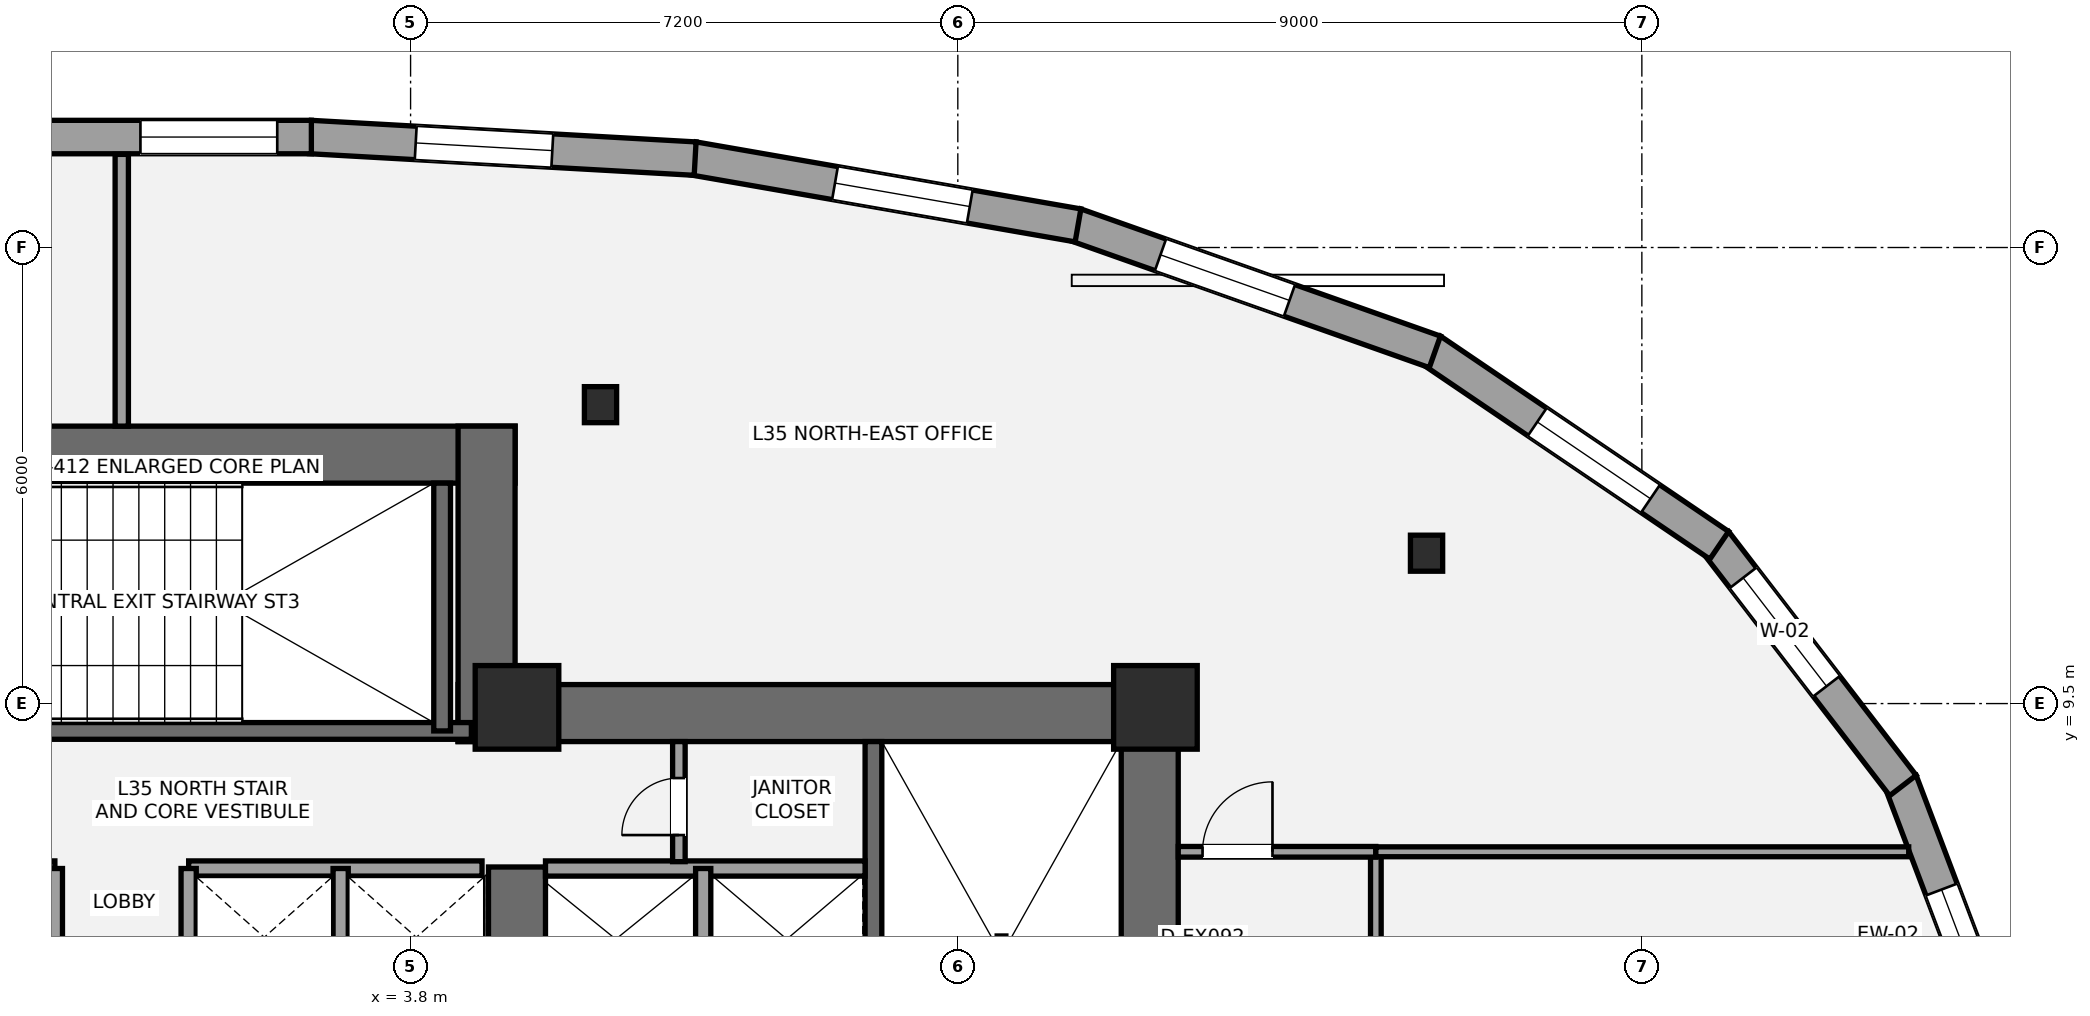
"""IFC4 building model, lengths in metres.
Left out: names, types, materials, properties, quantities, classifications, styles, units other than length and angle.
Written with IfcOpenShell. Run it as: python <this file> out.ifc"""

import sys

from ifc_helpers import new_model, si_unit, direction, frame, frame_2d, origin, origin_2d, place, context, subcontext, project, spatial, rectangle, i_section, extrude, element, fill, save


model = new_model("IFC4")
c1 = context("Model", 3, precision=1e-05, world=origin(), true_north=direction((0.0, 1.0)))
c2 = subcontext(c1, "Body", "Model", "MODEL_VIEW")
j1 = project(units=[si_unit("LENGTHUNIT", "METRE"), si_unit("PLANEANGLEUNIT", "RADIAN")], contexts=[c1])
p1 = place(None, origin())
s1 = spatial("IfcSite", under=j1, at=p1, CompositionType="ELEMENT")
p2 = place(p1, origin())
s2 = spatial("IfcBuilding", under=s1, at=p2, CompositionType="ELEMENT")
p3 = place(p2, frame((0.0, 0.0, 131.6)))
s3 = spatial("IfcBuildingStorey", under=s2, at=p3, CompositionType="ELEMENT", Elevation=131.6)
p4 = place(p3, frame((13.525, 1.1, 0.0), z_axis=(0.0, 0.0, 1.0), x_axis=(0.0, 1.0, 0.0)))
e1 = element("IfcWall", 1, at=p4, inside=s3, PredefinedType="SHEAR", context=c2, shape_type="SweptSolid", body=[
    extrude(rectangle(XDim=8.65, YDim=0.75, at=frame_2d((4.325, 0.0))), origin(), (0.0, 0.0, 1.0), 3.5),
])
p5 = place(p3, frame((4.425, 9.375, 0.0), z_axis=(0.0, 0.0, 1.0), x_axis=(1.0, 0.0, 0.0)))
e2 = element("IfcWall", 2, at=p5, inside=s3, PredefinedType="SHEAR", context=c2, shape_type="SweptSolid", body=[
    extrude(rectangle(XDim=9.475, YDim=0.75, at=frame_2d((4.737, 0.0))), origin(), (0.0, 0.0, 1.0), 3.5),
])
p6 = place(p3, frame((5.2, 5.35, 0.0), z_axis=(0.0, 0.0, 1.0), x_axis=(0.0, 1.0, 0.0)))
e3 = element("IfcWall", 3, at=p6, inside=s3, PredefinedType="SHEAR", context=c2, shape_type="SweptSolid", body=[
    extrude(rectangle(XDim=2.0, YDim=0.75, at=frame_2d((1.0, 0.0))), origin(), (0.0, 0.0, 1.0), 3.5),
])
p7 = place(p3, frame((9.89, 1.85, 0.0), z_axis=(0.0, 0.0, 1.0), x_axis=(0.0, 1.0, 0.0)))
e4 = element("IfcWall", 4, at=p7, inside=s3, PredefinedType="SHEAR", context=c2, shape_type="SweptSolid", body=[
    extrude(rectangle(XDim=7.15, YDim=0.22, at=frame_2d((3.575, 0.0))), origin(), (0.0, 0.0, 1.0), 3.5),
])
p8 = place(p3, frame((-5.175, 12.775, 0.0), z_axis=(0.0, 0.0, 1.0), x_axis=(1.0, 0.0, 0.0)))
e5 = element("IfcWall", 5, at=p8, inside=s3, PredefinedType="SHEAR", context=c2, shape_type="SweptSolid", body=[
    extrude(rectangle(XDim=10.35, YDim=0.75, at=frame_2d((5.175, 0.0))), origin(), (0.0, 0.0, 1.0), 3.5),
])
p9 = place(p3, frame((4.8, 9.0, 0.0), z_axis=(0.0, 0.0, 1.0), x_axis=(0.0, 1.0, 0.0)))
e6 = element("IfcWall", 6, at=p9, inside=s3, PredefinedType="SHEAR", context=c2, shape_type="SweptSolid", body=[
    extrude(rectangle(XDim=4.15, YDim=0.75, at=frame_2d((2.075, 0.0))), origin(), (0.0, 0.0, 1.0), 3.5),
])
p10 = place(p3, frame((-4.7, 9.14, 0.0), z_axis=(0.0, 0.0, 1.0), x_axis=(1.0, 0.0, 0.0)))
e7 = element("IfcWall", 7, at=p10, inside=s3, PredefinedType="SHEAR", context=c2, shape_type="SweptSolid", body=[
    extrude(rectangle(XDim=9.3, YDim=0.22, at=frame_2d((4.65, 0.0))), origin(), (0.0, 0.0, 1.0), 3.5),
])
p11 = place(p10, frame((1.15, 0.0, 0.0)))
e8 = element("IfcOpeningElement", 8, at=p11, cuts=e7, PredefinedType="OPENING", context=c2, shape_type="SweptSolid", body=[
    extrude(rectangle(XDim=1.05, YDim=2.15, at=frame_2d((0.525, 1.075))), frame((0.0, 0.12, 0.0), z_axis=(0.0, -1.0, 0.0), x_axis=(1.0, 0.0, 0.0)), (0.0, 0.0, 1.0), 0.24),
])
p12 = place(p3, frame((4.215, 9.14, 0.0), z_axis=(0.0, 0.0, 1.0), x_axis=(0.0, 1.0, 0.0)))
e9 = element("IfcWall", 9, at=p12, inside=s3, PredefinedType="SHEAR", context=c2, shape_type="SweptSolid", body=[
    extrude(rectangle(XDim=3.26, YDim=0.22, at=frame_2d((1.63, 0.0))), origin(), (0.0, 0.0, 1.0), 3.5),
])
for number, where, z_axis, x_axis in (
    (10, (5.2, 9.45, 0.0), (0.0, 0.0, 1.0), (1.0, 0.0, 0.0)),
    (11, (13.6, 9.45, 0.0), (0.0, 0.0, 1.0), (1.0, 0.0, 0.0)),
):
    element("IfcColumn", number, at=place(p3, frame(where, z_axis=z_axis, x_axis=x_axis)), inside=s3, PredefinedType="COLUMN", context=c2, shape_type="SweptSolid", body=[
        extrude(rectangle(XDim=1.1, YDim=1.1, at=origin_2d()), origin(), (0.0, 0.0, 1.0), 3.5),
    ])
for number, where, z_axis, x_axis in (
    (12, (17.167, 11.478, 0.0), (0.0, 0.0, 1.0), (1.0, 0.0, 0.0)),
    (13, (6.299, 13.433, 0.0), (0.0, 0.0, 1.0), (1.0, 0.0, 0.0)),
):
    element("IfcColumn", number, at=place(p3, frame(where, z_axis=z_axis, x_axis=x_axis)), inside=s3, PredefinedType="COLUMN", context=c2, shape_type="SweptSolid", body=[
        extrude(i_section(OverallWidth=0.424, OverallDepth=0.474, WebThickness=0.048, FlangeThickness=0.077, at=origin_2d()), origin(), (0.0, 0.0, 1.0), 3.5),
    ])
p13 = place(p3, frame((23.403, 8.478, 0.0), z_axis=(0.0, 0.0, 1.0), x_axis=(0.354219131363, -0.935162449511, 0.0)))
e14 = element("IfcWall", 14, at=p13, inside=s3, PredefinedType="STANDARD", context=c2, shape_type="SweptSolid", body=[
    extrude(rectangle(XDim=3.671, YDim=0.44, at=frame_2d((1.835, 0.0))), origin(), (0.0, 0.0, 1.0), 2.478),
])
p14 = place(p13, frame((1.524, 0.0, 0.65)))
e15 = element("IfcOpeningElement", 15, at=p14, cuts=e14, PredefinedType="OPENING", context=c2, shape_type="SweptSolid", body=[
    extrude(rectangle(XDim=1.8, YDim=1.7, at=frame_2d((0.9, 0.85))), frame((0.0, 0.23, 0.0), z_axis=(0.0, -1.0, 0.0), x_axis=(1.0, 0.0, 0.0)), (0.0, 0.0, 1.0), 0.46),
])
p15 = place(p3, frame((20.967, 11.63, 0.0), z_axis=(0.0, 0.0, 1.0), x_axis=(0.60975157382, -0.792592592839, 0.0)))
e16 = element("IfcWall", 16, at=p15, inside=s3, PredefinedType="STANDARD", context=c2, shape_type="SweptSolid", body=[
    extrude(rectangle(XDim=4.047, YDim=0.44, at=frame_2d((2.023, 0.0))), origin(), (0.0, 0.0, 1.0), 2.482),
])
p16 = place(p15, frame((0.599, 0.0, 0.65)))
e17 = element("IfcOpeningElement", 17, at=p16, cuts=e16, PredefinedType="OPENING", context=c2, shape_type="SweptSolid", body=[
    extrude(rectangle(XDim=1.8, YDim=1.7, at=frame_2d((0.9, 0.85))), frame((0.0, 0.23, 0.0), z_axis=(0.0, -1.0, 0.0), x_axis=(1.0, 0.0, 0.0)), (0.0, 0.0, 1.0), 0.46),
])
p17 = place(p3, frame((17.227, 14.152, 0.0), z_axis=(0.0, 0.0, 1.0), x_axis=(0.827670311179, -0.561214625605, 0.0)))
e18 = element("IfcWall", 18, at=p17, inside=s3, PredefinedType="STANDARD", context=c2, shape_type="SweptSolid", body=[
    extrude(rectangle(XDim=4.58, YDim=0.44, at=frame_2d((2.29, 0.0))), origin(), (0.0, 0.0, 1.0), 2.482),
])
p18 = place(p17, frame((1.688, 0.0, 0.65)))
e19 = element("IfcOpeningElement", 19, at=p18, cuts=e18, PredefinedType="OPENING", context=c2, shape_type="SweptSolid", body=[
    extrude(rectangle(XDim=1.8, YDim=1.7, at=frame_2d((0.9, 0.85))), frame((0.0, 0.23, 0.0), z_axis=(0.0, -1.0, 0.0), x_axis=(1.0, 0.0, 0.0)), (0.0, 0.0, 1.0), 0.46),
])
p19 = place(p3, frame((12.546, 15.8, 0.0), z_axis=(0.0, 0.0, 1.0), x_axis=(0.942780868171, -0.333413009061, 0.0)))
e20 = element("IfcWall", 20, at=p19, inside=s3, PredefinedType="STANDARD", context=c2, shape_type="SweptSolid", body=[
    extrude(rectangle(XDim=5.018, YDim=0.44, at=frame_2d((2.509, 0.0))), origin(), (0.0, 0.0, 1.0), 2.478),
])
p20 = place(p19, frame((1.189, 0.0, 0.65)))
e21 = element("IfcOpeningElement", 21, at=p20, cuts=e20, PredefinedType="OPENING", context=c2, shape_type="SweptSolid", body=[
    extrude(rectangle(XDim=1.8, YDim=1.7, at=frame_2d((0.9, 0.85))), frame((0.0, 0.23, 0.0), z_axis=(0.0, -1.0, 0.0), x_axis=(1.0, 0.0, 0.0)), (0.0, 0.0, 1.0), 0.46),
])
p21 = place(p3, frame((7.518, 16.673, 0.0), z_axis=(0.0, 0.0, 1.0), x_axis=(0.985177916526, -0.171535631254, 0.0)))
e22 = element("IfcWall", 22, at=p21, inside=s3, PredefinedType="STANDARD", context=c2, shape_type="SweptSolid", body=[
    extrude(rectangle(XDim=5.139, YDim=0.44, at=frame_2d((2.57, 0.0))), origin(), (0.0, 0.0, 1.0), 2.478),
])
p22 = place(p21, frame((1.894, 0.0, 0.65)))
e23 = element("IfcOpeningElement", 23, at=p22, cuts=e22, PredefinedType="OPENING", context=c2, shape_type="SweptSolid", body=[
    extrude(rectangle(XDim=1.8, YDim=1.7, at=frame_2d((0.9, 0.85))), frame((0.0, 0.23, 0.0), z_axis=(0.0, -1.0, 0.0), x_axis=(1.0, 0.0, 0.0)), (0.0, 0.0, 1.0), 0.46),
])
p23 = place(p3, frame((2.482, 16.954, 0.0), z_axis=(0.0, 0.0, 1.0), x_axis=(0.99842742965, -0.056059501621, 0.0)))
e24 = element("IfcWall", 24, at=p23, inside=s3, PredefinedType="STANDARD", context=c2, shape_type="SweptSolid", body=[
    extrude(rectangle(XDim=5.069, YDim=0.44, at=frame_2d((2.535, 0.0))), origin(), (0.0, 0.0, 1.0), 2.478),
])
p24 = place(p23, frame((1.387, 0.0, 0.65)))
e25 = element("IfcOpeningElement", 25, at=p24, cuts=e24, PredefinedType="OPENING", context=c2, shape_type="SweptSolid", body=[
    extrude(rectangle(XDim=1.8, YDim=1.7, at=frame_2d((0.9, 0.85))), frame((0.0, 0.23, 0.0), z_axis=(0.0, -1.0, 0.0), x_axis=(1.0, 0.0, 0.0)), (0.0, 0.0, 1.0), 0.46),
])
p25 = place(p3, frame((-2.495, 16.953, 0.0), z_axis=(0.0, 0.0, 1.0), x_axis=(1.0, 0.0, 0.0)))
e26 = element("IfcWall", 26, at=p25, inside=s3, PredefinedType="STANDARD", context=c2, shape_type="SweptSolid", body=[
    extrude(rectangle(XDim=4.989, YDim=0.44, at=frame_2d((2.495, 0.0))), origin(), (0.0, 0.0, 1.0), 2.482),
])
p26 = place(p25, frame((2.74, 0.0, 0.65)))
e27 = element("IfcOpeningElement", 27, at=p26, cuts=e26, PredefinedType="OPENING", context=c2, shape_type="SweptSolid", body=[
    extrude(rectangle(XDim=1.8, YDim=1.7, at=frame_2d((0.9, 0.85))), frame((0.0, 0.23, 0.0), z_axis=(0.0, -1.0, 0.0), x_axis=(1.0, 0.0, 0.0)), (0.0, 0.0, 1.0), 0.46),
])
p27 = place(p3, frame((5.575, 7.33, 0.0), z_axis=(0.0, 0.0, 1.0), x_axis=(1.0, 0.0, 0.0)))
e28 = element("IfcWall", 28, at=p27, inside=s3, PredefinedType="SOLIDWALL", context=c2, shape_type="SweptSolid", body=[
    extrude(rectangle(XDim=4.205, YDim=0.2, at=frame_2d((2.103, 0.0))), origin(), (0.0, 0.0, 1.0), 3.26),
])
p28 = place(p3, frame((7.65, 5.47, 0.0), z_axis=(0.0, 0.0, 1.0), x_axis=(0.0, 1.0, 0.0)))
e29 = element("IfcWall", 29, at=p28, inside=s3, PredefinedType="SOLIDWALL", context=c2, shape_type="SweptSolid", body=[
    extrude(rectangle(XDim=1.86, YDim=0.2, at=frame_2d((0.93, 0.0))), origin(), (0.0, 0.0, 1.0), 3.26),
])
for number, where, z_axis, x_axis in (
    (30, (-4.74, 7.33, 0.0), (0.0, 0.0, 1.0), (1.0, 0.0, 0.0)),
    (31, (0.88, 7.33, 0.0), (0.0, 0.0, 1.0), (1.0, 0.0, 0.0)),
):
    element("IfcWall", number, at=place(p3, frame(where, z_axis=z_axis, x_axis=x_axis)), inside=s3, PredefinedType="SOLIDWALL", context=c2, shape_type="SweptSolid", body=[
        extrude(rectangle(XDim=3.86, YDim=0.2, at=frame_2d((1.93, 0.0))), origin(), (0.0, 0.0, 1.0), 3.26),
    ])
for number, where, z_axis, x_axis in (
    (32, (2.88, 5.52, 0.0), (0.0, 0.0, 1.0), (0.0, 1.0, 0.0)),
    (33, (-0.88, 5.52, 0.0), (0.0, 0.0, 1.0), (0.0, 1.0, 0.0)),
    (34, (0.88, 5.52, 0.0), (0.0, 0.0, 1.0), (0.0, 1.0, 0.0)),
):
    element("IfcWall", number, at=place(p3, frame(where, z_axis=z_axis, x_axis=x_axis)), inside=s3, PredefinedType="SOLIDWALL", context=c2, shape_type="SweptSolid", body=[
        extrude(rectangle(XDim=1.81, YDim=0.2, at=frame_2d((0.905, 0.0))), origin(), (0.0, 0.0, 1.0), 3.26),
    ])
p29 = place(p3, frame((7.33, 7.42, 0.0), z_axis=(0.0, 0.0, 1.0), x_axis=(0.0, 1.0, 0.0)))
e35 = element("IfcWall", 35, at=p29, inside=s3, PredefinedType="PARTITIONING", context=c2, shape_type="SweptSolid", body=[
    extrude(rectangle(XDim=1.58, YDim=0.165, at=frame_2d((0.79, 0.0))), origin(), (0.0, 0.0, 1.0), 3.26),
])
p30 = place(p29, frame((0.35, 0.0, 0.0)))
e36 = element("IfcOpeningElement", 36, at=p30, cuts=e35, PredefinedType="OPENING", context=c2, shape_type="SweptSolid", body=[
    extrude(rectangle(XDim=0.75, YDim=2.1, at=frame_2d((0.375, 1.05))), frame((0.0, 0.093, 0.0), z_axis=(0.0, -1.0, 0.0), x_axis=(1.0, 0.0, 0.0)), (0.0, 0.0, 1.0), 0.185),
])
p31 = place(p3, frame((16.5, -14.16, 0.0), z_axis=(0.0, 0.0, 1.0), x_axis=(0.0, 1.0, 0.0)))
e37 = element("IfcWall", 37, at=p31, inside=s3, PredefinedType="PARTITIONING", context=c2, shape_type="SweptSolid", body=[
    extrude(rectangle(XDim=21.71, YDim=0.14, at=frame_2d((10.855, 0.0))), origin(), (0.0, 0.0, 1.0), 2.713),
])
p32 = place(p31, frame((9.41, 0.0, 0.0)))
e38 = element("IfcOpeningElement", 38, at=p32, cuts=e37, PredefinedType="OPENING", context=c2, shape_type="SweptSolid", body=[
    extrude(rectangle(XDim=0.9, YDim=2.1, at=frame_2d((0.45, 1.05))), frame((0.0, 0.08, 0.0), z_axis=(0.0, -1.0, 0.0), x_axis=(1.0, 0.0, 0.0)), (0.0, 0.0, 1.0), 0.16),
])
p33 = place(p31, frame((15.01, 0.0, 0.0)))
e39 = element("IfcOpeningElement", 39, at=p33, cuts=e37, PredefinedType="OPENING", context=c2, shape_type="SweptSolid", body=[
    extrude(rectangle(XDim=0.9, YDim=2.1, at=frame_2d((0.45, 1.05))), frame((0.0, 0.08, 0.0), z_axis=(0.0, -1.0, 0.0), x_axis=(1.0, 0.0, 0.0)), (0.0, 0.0, 1.0), 0.16),
])
p34 = place(p31, frame((19.285, 0.0, 0.0)))
e40 = element("IfcOpeningElement", 40, at=p34, cuts=e37, PredefinedType="OPENING", context=c2, shape_type="SweptSolid", body=[
    extrude(rectangle(XDim=0.9, YDim=2.1, at=frame_2d((0.45, 1.05))), frame((0.0, 0.08, 0.0), z_axis=(0.0, -1.0, 0.0), x_axis=(1.0, 0.0, 0.0)), (0.0, 0.0, 1.0), 0.16),
])
p35 = place(p3, frame((13.9, 7.55, 0.0), z_axis=(0.0, 0.0, 1.0), x_axis=(1.0, 0.0, 0.0)))
e41 = element("IfcWall", 41, at=p35, inside=s3, PredefinedType="PARTITIONING", context=c2, shape_type="SweptSolid", body=[
    extrude(rectangle(XDim=2.6, YDim=0.14, at=frame_2d((1.3, 0.0))), origin(), (0.0, 0.0, 1.0), 2.713),
])
p36 = place(p35, frame((0.32, 0.0, 0.0)))
e42 = element("IfcOpeningElement", 42, at=p36, cuts=e41, PredefinedType="OPENING", context=c2, shape_type="SweptSolid", body=[
    extrude(rectangle(XDim=0.92, YDim=2.15, at=frame_2d((0.46, 1.075))), frame((0.0, 0.08, 0.0), z_axis=(0.0, -1.0, 0.0), x_axis=(1.0, 0.0, 0.0)), (0.0, 0.0, 1.0), 0.16),
])
p37 = place(p3, frame((0.0, 13.15, 0.0), z_axis=(0.0, 0.0, 1.0), x_axis=(0.0, 1.0, 0.0)))
e43 = element("IfcWall", 43, at=p37, inside=s3, PredefinedType="PARTITIONING", context=c2, shape_type="SweptSolid", body=[
    extrude(rectangle(XDim=3.575, YDim=0.175, at=frame_2d((1.788, 0.0))), origin(), (0.0, 0.0, 1.0), 3.26),
])
p38 = place(p3, frame((16.5, 7.55, 0.0), z_axis=(0.0, 0.0, 1.0), x_axis=(1.0, 0.0, 0.0)))
e44 = element("IfcWall", 44, at=p38, inside=s3, PredefinedType="PARTITIONING", context=c2, shape_type="SweptSolid", body=[
    extrude(rectangle(XDim=7.011, YDim=0.13, at=frame_2d((3.505, 0.0))), origin(), (0.0, 0.0, 1.0), 2.713),
])
p39 = place(p14, origin())
e45 = element("IfcWindow", 45, at=p39, inside=s3, PartitioningType="SINGLE_PANEL", PredefinedType="WINDOW", context=c2, shape_type="SweptSolid", body=[
    extrude(rectangle(XDim=1.8, YDim=1.7, at=frame_2d((0.9, 0.85))), frame((0.0, -0.01, 0.0), z_axis=(0.0, -1.0, 0.0), x_axis=(1.0, 0.0, 0.0)), (0.0, 0.0, 1.0), 0.06),
])
fill(e15, e45)
p40 = place(p16, origin())
e46 = element("IfcWindow", 46, at=p40, inside=s3, PartitioningType="SINGLE_PANEL", PredefinedType="WINDOW", context=c2, shape_type="SweptSolid", body=[
    extrude(rectangle(XDim=1.8, YDim=1.7, at=frame_2d((0.9, 0.85))), frame((0.0, -0.01, 0.0), z_axis=(0.0, -1.0, 0.0), x_axis=(1.0, 0.0, 0.0)), (0.0, 0.0, 1.0), 0.06),
])
fill(e17, e46)
p41 = place(p18, origin())
e47 = element("IfcWindow", 47, at=p41, inside=s3, PartitioningType="SINGLE_PANEL", PredefinedType="WINDOW", context=c2, shape_type="SweptSolid", body=[
    extrude(rectangle(XDim=1.8, YDim=1.7, at=frame_2d((0.9, 0.85))), frame((0.0, -0.01, 0.0), z_axis=(0.0, -1.0, 0.0), x_axis=(1.0, 0.0, 0.0)), (0.0, 0.0, 1.0), 0.06),
])
fill(e19, e47)
p42 = place(p20, origin())
e48 = element("IfcWindow", 48, at=p42, inside=s3, PartitioningType="SINGLE_PANEL", PredefinedType="WINDOW", context=c2, shape_type="SweptSolid", body=[
    extrude(rectangle(XDim=1.8, YDim=1.7, at=frame_2d((0.9, 0.85))), frame((0.0, -0.01, 0.0), z_axis=(0.0, -1.0, 0.0), x_axis=(1.0, 0.0, 0.0)), (0.0, 0.0, 1.0), 0.06),
])
fill(e21, e48)
p43 = place(p22, origin())
e49 = element("IfcWindow", 49, at=p43, inside=s3, PartitioningType="SINGLE_PANEL", PredefinedType="WINDOW", context=c2, shape_type="SweptSolid", body=[
    extrude(rectangle(XDim=1.8, YDim=1.7, at=frame_2d((0.9, 0.85))), frame((0.0, -0.01, 0.0), z_axis=(0.0, -1.0, 0.0), x_axis=(1.0, 0.0, 0.0)), (0.0, 0.0, 1.0), 0.06),
])
fill(e23, e49)
p44 = place(p24, origin())
e50 = element("IfcWindow", 50, at=p44, inside=s3, PartitioningType="SINGLE_PANEL", PredefinedType="WINDOW", context=c2, shape_type="SweptSolid", body=[
    extrude(rectangle(XDim=1.8, YDim=1.7, at=frame_2d((0.9, 0.85))), frame((0.0, -0.01, 0.0), z_axis=(0.0, -1.0, 0.0), x_axis=(1.0, 0.0, 0.0)), (0.0, 0.0, 1.0), 0.06),
])
fill(e25, e50)
p45 = place(p26, origin())
e51 = element("IfcWindow", 51, at=p45, inside=s3, PartitioningType="SINGLE_PANEL", PredefinedType="WINDOW", context=c2, shape_type="SweptSolid", body=[
    extrude(rectangle(XDim=1.8, YDim=1.7, at=frame_2d((0.9, 0.85))), frame((0.0, -0.01, 0.0), z_axis=(0.0, -1.0, 0.0), x_axis=(1.0, 0.0, 0.0)), (0.0, 0.0, 1.0), 0.06),
])
fill(e27, e51)
p46 = place(p30, origin())
e52 = element("IfcDoor", 52, at=p46, inside=s3, OperationType="SINGLE_SWING_LEFT", PredefinedType="DOOR", context=c2, shape_type="SweptSolid", body=[
    extrude(rectangle(XDim=0.75, YDim=2.1, at=frame_2d((0.375, 1.05))), frame((0.0, 0.025, 0.0), z_axis=(0.0, -1.0, 0.0), x_axis=(1.0, 0.0, 0.0)), (0.0, 0.0, 1.0), 0.05),
])
fill(e36, e52)
p47 = place(p36, origin())
e53 = element("IfcDoor", 53, at=p47, inside=s3, OperationType="SINGLE_SWING_RIGHT", PredefinedType="DOOR", context=c2, shape_type="SweptSolid", body=[
    extrude(rectangle(XDim=0.92, YDim=2.15, at=frame_2d((0.46, 1.075))), frame((0.0, 0.025, 0.0), z_axis=(0.0, -1.0, 0.0), x_axis=(1.0, 0.0, 0.0)), (0.0, 0.0, 1.0), 0.05),
])
fill(e42, e53)
save(model, sys.argv[1])
